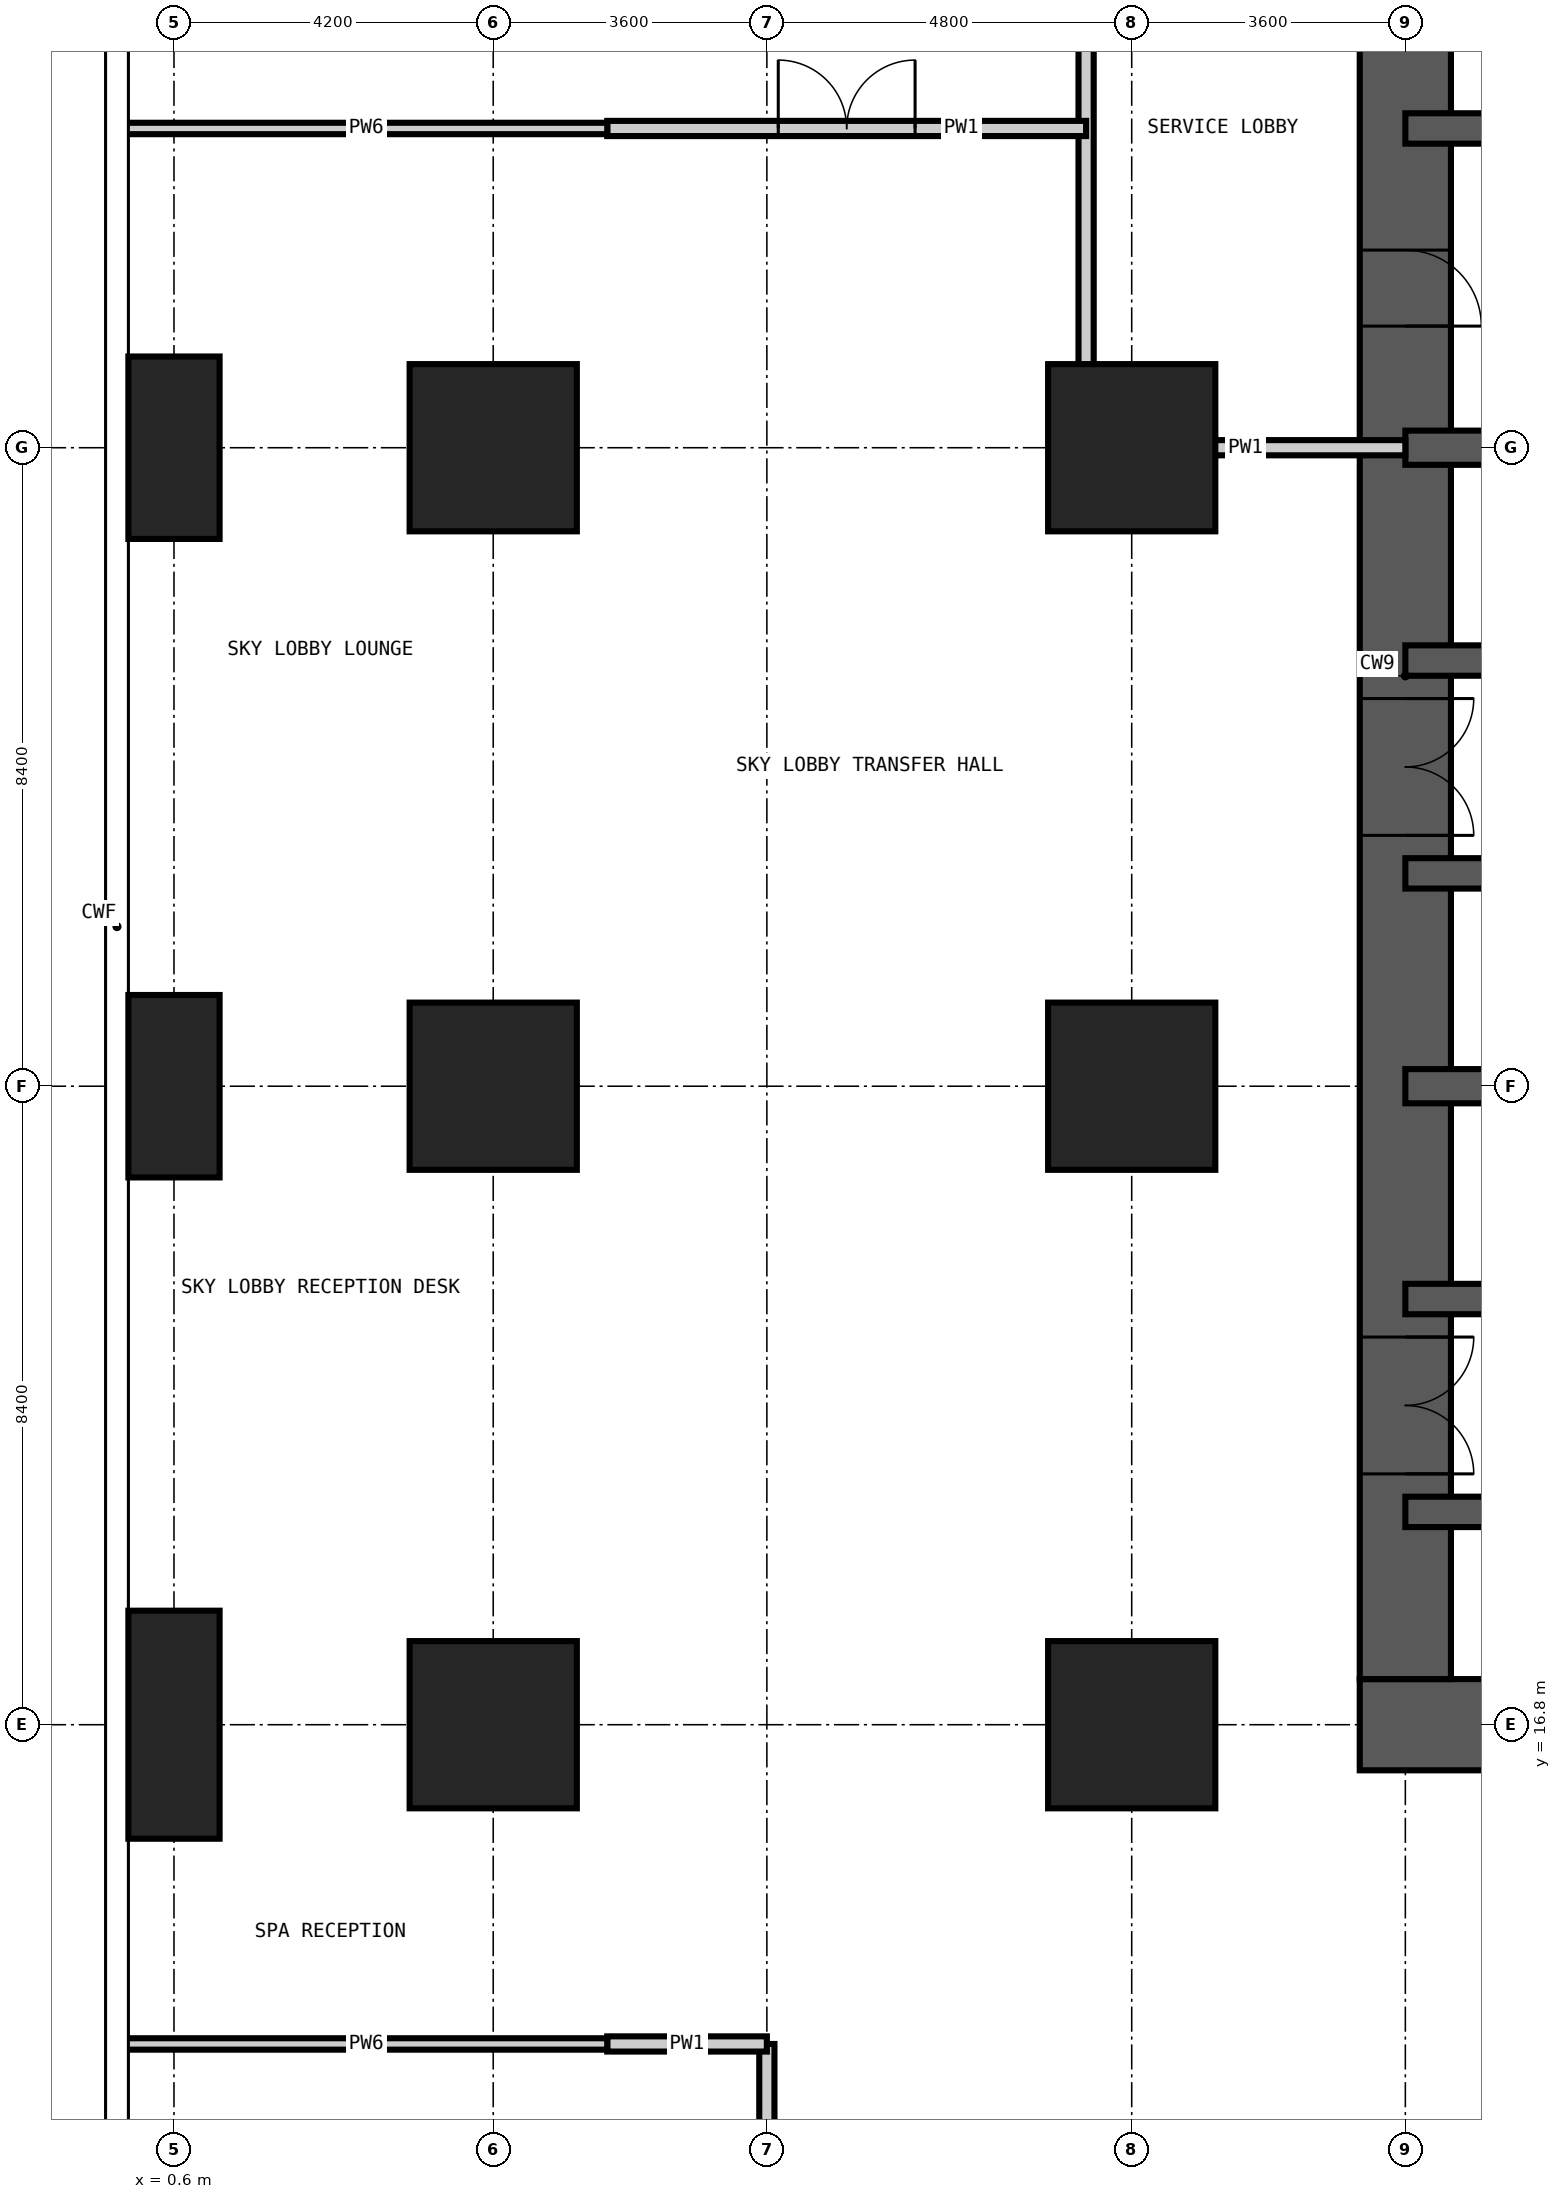
"""IFC4 building model, lengths in metres.
Left out: names, types, materials, properties, quantities, classifications, styles, units other than length and angle.
Written with IfcOpenShell. Run it as: python <this file> out.ifc"""

import sys

from ifc_helpers import new_model, si_unit, direction, frame, frame_2d, origin, origin_2d, place, context, subcontext, project, spatial, rectangle, extrude, element, fill, save


model = new_model("IFC4")
c1 = context("Model", 3, precision=1e-05, world=origin(), true_north=direction((0.0, 1.0)))
c2 = subcontext(c1, "Body", "Model", "MODEL_VIEW")
j1 = project(units=[si_unit("LENGTHUNIT", "METRE"), si_unit("PLANEANGLEUNIT", "RADIAN")], contexts=[c1])
p1 = place(None, origin())
s1 = spatial("IfcSite", under=j1, at=p1, CompositionType="ELEMENT")
p2 = place(p1, origin())
s2 = spatial("IfcBuilding", under=s1, at=p2, CompositionType="ELEMENT")
p3 = place(p2, frame((0.0, 0.0, 147.6)))
s3 = spatial("IfcBuildingStorey", under=s2, at=p3, CompositionType="ELEMENT", Elevation=147.6)
p4 = place(p3, frame((0.6, 16.8, -0.35), z_axis=(0.0, 0.0, 1.0), x_axis=(1.0, 0.0, 0.0)))
e1 = element("IfcColumn", 1, at=p4, inside=s3, PredefinedType="COLUMN", context=c2, shape_type="SweptSolid", body=[
    extrude(rectangle(XDim=1.2, YDim=3.0, at=origin_2d()), origin(), (0.0, 0.0, 1.0), 5.95),
])
for number, where, z_axis, x_axis in (
    (2, (0.6, 25.2, -0.35), (0.0, 0.0, 1.0), (1.0, 0.0, 0.0)),
    (3, (0.6, 33.6, -0.35), (0.0, 0.0, 1.0), (1.0, 0.0, 0.0)),
):
    element("IfcColumn", number, at=place(p3, frame(where, z_axis=z_axis, x_axis=x_axis)), inside=s3, PredefinedType="COLUMN", context=c2, shape_type="SweptSolid", body=[
        extrude(rectangle(XDim=1.2, YDim=2.4, at=origin_2d()), origin(), (0.0, 0.0, 1.0), 5.95),
    ])
for number, where, z_axis, x_axis in (
    (4, (4.8, 16.8, -0.35), (0.0, 0.0, 1.0), (1.0, 0.0, 0.0)),
    (5, (4.8, 25.2, -0.35), (0.0, 0.0, 1.0), (1.0, 0.0, 0.0)),
    (6, (4.8, 33.6, -0.35), (0.0, 0.0, 1.0), (1.0, 0.0, 0.0)),
    (7, (13.2, 16.8, -0.35), (0.0, 0.0, 1.0), (1.0, 0.0, 0.0)),
    (8, (13.2, 25.2, -0.35), (0.0, 0.0, 1.0), (1.0, 0.0, 0.0)),
    (9, (13.2, 33.6, -0.35), (0.0, 0.0, 1.0), (1.0, 0.0, 0.0)),
):
    element("IfcColumn", number, at=place(p3, frame(where, z_axis=z_axis, x_axis=x_axis)), inside=s3, PredefinedType="COLUMN", context=c2, shape_type="SweptSolid", body=[
        extrude(rectangle(XDim=2.2, YDim=2.2, at=origin_2d()), origin(), (0.0, 0.0, 1.0), 5.95),
    ])
p5 = place(p3, frame((16.2, 16.8, -0.35), z_axis=(0.0, 0.0, 1.0), x_axis=(1.0, 0.0, 0.0)))
e10 = element("IfcWall", 10, at=p5, inside=s3, PredefinedType="SHEAR", context=c2, shape_type="SweptSolid", body=[
    extrude(rectangle(XDim=26.4, YDim=1.2, at=frame_2d((13.2, 0.0))), origin(), (0.0, 0.0, 1.0), 5.95),
])
p6 = place(p5, frame((12.7, 0.0, 0.35)))
e11 = element("IfcOpeningElement", 11, at=p6, cuts=e10, PredefinedType="OPENING", context=c2, shape_type="SweptSolid", body=[
    extrude(rectangle(XDim=1.0, YDim=2.1, at=frame_2d((0.5, 1.05))), frame((0.0, 0.61, 0.0), z_axis=(0.0, -1.0, 0.0), x_axis=(1.0, 0.0, 0.0)), (0.0, 0.0, 1.0), 1.22),
])
p7 = place(p5, frame((19.0, 0.0, 0.35)))
e12 = element("IfcOpeningElement", 12, at=p7, cuts=e10, PredefinedType="OPENING", context=c2, shape_type="SweptSolid", body=[
    extrude(rectangle(XDim=1.0, YDim=2.1, at=frame_2d((0.5, 1.05))), frame((0.0, 0.61, 0.0), z_axis=(0.0, -1.0, 0.0), x_axis=(1.0, 0.0, 0.0)), (0.0, 0.0, 1.0), 1.22),
])
p8 = place(p3, frame((16.8, 41.4, -0.35), z_axis=(0.0, 0.0, 1.0), x_axis=(0.0, -1.0, 0.0)))
e13 = element("IfcWall", 13, at=p8, inside=s3, PredefinedType="SHEAR", context=c2, shape_type="SweptSolid", body=[
    extrude(rectangle(XDim=24.0, YDim=1.2, at=frame_2d((12.0, 0.0))), origin(), (0.0, 0.0, 1.0), 5.95),
])
p9 = place(p8, frame((11.1, 0.0, 0.35)))
e14 = element("IfcOpeningElement", 14, at=p9, cuts=e13, PredefinedType="OPENING", context=c2, shape_type="SweptSolid", body=[
    extrude(rectangle(XDim=1.8, YDim=2.2, at=frame_2d((0.9, 1.1))), frame((0.0, 0.61, 0.0), z_axis=(0.0, -1.0, 0.0), x_axis=(1.0, 0.0, 0.0)), (0.0, 0.0, 1.0), 1.22),
])
p10 = place(p8, frame((19.5, 0.0, 0.35)))
e15 = element("IfcOpeningElement", 15, at=p10, cuts=e13, PredefinedType="OPENING", context=c2, shape_type="SweptSolid", body=[
    extrude(rectangle(XDim=1.8, YDim=2.2, at=frame_2d((0.9, 1.1))), frame((0.0, 0.61, 0.0), z_axis=(0.0, -1.0, 0.0), x_axis=(1.0, 0.0, 0.0)), (0.0, 0.0, 1.0), 1.22),
])
p11 = place(p8, frame((5.2, 0.0, 0.35)))
e16 = element("IfcOpeningElement", 16, at=p11, cuts=e13, PredefinedType="OPENING", context=c2, shape_type="SweptSolid", body=[
    extrude(rectangle(XDim=1.0, YDim=2.1, at=frame_2d((0.5, 1.05))), frame((0.0, 0.61, 0.0), z_axis=(0.0, -1.0, 0.0), x_axis=(1.0, 0.0, 0.0)), (0.0, 0.0, 1.0), 1.22),
])
p12 = place(p3, frame((16.8, 19.6, -0.35), z_axis=(0.0, 0.0, 1.0), x_axis=(1.0, 0.0, 0.0)))
e17 = element("IfcWall", 17, at=p12, inside=s3, PredefinedType="SHEAR", context=c2, shape_type="SweptSolid", body=[
    extrude(rectangle(XDim=8.4, YDim=0.4, at=frame_2d((4.2, 0.0))), origin(), (0.0, 0.0, 1.0), 5.95),
])
p13 = place(p12, frame((1.55, 0.0, 0.35)))
e18 = element("IfcOpeningElement", 18, at=p13, cuts=e17, PredefinedType="OPENING", context=c2, shape_type="SweptSolid", body=[
    extrude(rectangle(XDim=1.1, YDim=2.2, at=frame_2d((0.55, 1.1))), frame((0.0, 0.21, 0.0), z_axis=(0.0, -1.0, 0.0), x_axis=(1.0, 0.0, 0.0)), (0.0, 0.0, 1.0), 0.42),
])
p14 = place(p12, frame((5.75, 0.0, 0.35)))
e19 = element("IfcOpeningElement", 19, at=p14, cuts=e17, PredefinedType="OPENING", context=c2, shape_type="SweptSolid", body=[
    extrude(rectangle(XDim=1.1, YDim=2.2, at=frame_2d((0.55, 1.1))), frame((0.0, 0.21, 0.0), z_axis=(0.0, -1.0, 0.0), x_axis=(1.0, 0.0, 0.0)), (0.0, 0.0, 1.0), 0.42),
])
p15 = place(p3, frame((16.8, 22.4, -0.35), z_axis=(0.0, 0.0, 1.0), x_axis=(1.0, 0.0, 0.0)))
e20 = element("IfcWall", 20, at=p15, inside=s3, PredefinedType="SHEAR", context=c2, shape_type="SweptSolid", body=[
    extrude(rectangle(XDim=8.4, YDim=0.4, at=frame_2d((4.2, 0.0))), origin(), (0.0, 0.0, 1.0), 5.95),
])
p16 = place(p15, frame((1.55, 0.0, 0.35)))
e21 = element("IfcOpeningElement", 21, at=p16, cuts=e20, PredefinedType="OPENING", context=c2, shape_type="SweptSolid", body=[
    extrude(rectangle(XDim=1.1, YDim=2.2, at=frame_2d((0.55, 1.1))), frame((0.0, 0.21, 0.0), z_axis=(0.0, -1.0, 0.0), x_axis=(1.0, 0.0, 0.0)), (0.0, 0.0, 1.0), 0.42),
])
p17 = place(p15, frame((5.75, 0.0, 0.35)))
e22 = element("IfcOpeningElement", 22, at=p17, cuts=e20, PredefinedType="OPENING", context=c2, shape_type="SweptSolid", body=[
    extrude(rectangle(XDim=1.1, YDim=2.2, at=frame_2d((0.55, 1.1))), frame((0.0, 0.21, 0.0), z_axis=(0.0, -1.0, 0.0), x_axis=(1.0, 0.0, 0.0)), (0.0, 0.0, 1.0), 0.42),
])
p18 = place(p3, frame((16.8, 28.0, -0.35), z_axis=(0.0, 0.0, 1.0), x_axis=(1.0, 0.0, 0.0)))
e23 = element("IfcWall", 23, at=p18, inside=s3, PredefinedType="SHEAR", context=c2, shape_type="SweptSolid", body=[
    extrude(rectangle(XDim=8.4, YDim=0.4, at=frame_2d((4.2, 0.0))), origin(), (0.0, 0.0, 1.0), 5.95),
])
p19 = place(p18, frame((1.55, 0.0, 0.35)))
e24 = element("IfcOpeningElement", 24, at=p19, cuts=e23, PredefinedType="OPENING", context=c2, shape_type="SweptSolid", body=[
    extrude(rectangle(XDim=1.1, YDim=2.2, at=frame_2d((0.55, 1.1))), frame((0.0, 0.21, 0.0), z_axis=(0.0, -1.0, 0.0), x_axis=(1.0, 0.0, 0.0)), (0.0, 0.0, 1.0), 0.42),
])
p20 = place(p18, frame((5.75, 0.0, 0.35)))
e25 = element("IfcOpeningElement", 25, at=p20, cuts=e23, PredefinedType="OPENING", context=c2, shape_type="SweptSolid", body=[
    extrude(rectangle(XDim=1.1, YDim=2.2, at=frame_2d((0.55, 1.1))), frame((0.0, 0.21, 0.0), z_axis=(0.0, -1.0, 0.0), x_axis=(1.0, 0.0, 0.0)), (0.0, 0.0, 1.0), 0.42),
])
p21 = place(p3, frame((16.8, 30.8, -0.35), z_axis=(0.0, 0.0, 1.0), x_axis=(1.0, 0.0, 0.0)))
e26 = element("IfcWall", 26, at=p21, inside=s3, PredefinedType="SHEAR", context=c2, shape_type="SweptSolid", body=[
    extrude(rectangle(XDim=8.4, YDim=0.4, at=frame_2d((4.2, 0.0))), origin(), (0.0, 0.0, 1.0), 5.95),
])
p22 = place(p21, frame((1.55, 0.0, 0.35)))
e27 = element("IfcOpeningElement", 27, at=p22, cuts=e26, PredefinedType="OPENING", context=c2, shape_type="SweptSolid", body=[
    extrude(rectangle(XDim=1.1, YDim=2.2, at=frame_2d((0.55, 1.1))), frame((0.0, 0.21, 0.0), z_axis=(0.0, -1.0, 0.0), x_axis=(1.0, 0.0, 0.0)), (0.0, 0.0, 1.0), 0.42),
])
p23 = place(p21, frame((5.75, 0.0, 0.35)))
e28 = element("IfcOpeningElement", 28, at=p23, cuts=e26, PredefinedType="OPENING", context=c2, shape_type="SweptSolid", body=[
    extrude(rectangle(XDim=1.1, YDim=2.2, at=frame_2d((0.55, 1.1))), frame((0.0, 0.21, 0.0), z_axis=(0.0, -1.0, 0.0), x_axis=(1.0, 0.0, 0.0)), (0.0, 0.0, 1.0), 0.42),
])
p24 = place(p3, frame((16.8, 37.8, -0.35), z_axis=(0.0, 0.0, 1.0), x_axis=(1.0, 0.0, 0.0)))
e29 = element("IfcWall", 29, at=p24, inside=s3, PredefinedType="SHEAR", context=c2, shape_type="SweptSolid", body=[
    extrude(rectangle(XDim=8.4, YDim=0.4, at=frame_2d((4.2, 0.0))), origin(), (0.0, 0.0, 1.0), 5.95),
])
p25 = place(p3, frame((16.8, 25.2, -0.35), z_axis=(0.0, 0.0, 1.0), x_axis=(1.0, 0.0, 0.0)))
e30 = element("IfcWall", 30, at=p25, inside=s3, PredefinedType="SHEAR", context=c2, shape_type="SweptSolid", body=[
    extrude(rectangle(XDim=25.2, YDim=0.45, at=frame_2d((12.6, 0.0))), origin(), (0.0, 0.0, 1.0), 5.95),
])
p26 = place(p3, frame((16.8, 33.6, -0.35), z_axis=(0.0, 0.0, 1.0), x_axis=(1.0, 0.0, 0.0)))
e31 = element("IfcWall", 31, at=p26, inside=s3, PredefinedType="SHEAR", context=c2, shape_type="SweptSolid", body=[
    extrude(rectangle(XDim=25.2, YDim=0.45, at=frame_2d((12.6, 0.0))), origin(), (0.0, 0.0, 1.0), 5.95),
])
p27 = place(p26, frame((14.2, 0.0, 0.35)))
e32 = element("IfcOpeningElement", 32, at=p27, cuts=e31, PredefinedType="OPENING", context=c2, shape_type="SweptSolid", body=[
    extrude(rectangle(XDim=1.0, YDim=2.1, at=frame_2d((0.5, 1.05))), frame((0.0, 0.235, 0.0), z_axis=(0.0, -1.0, 0.0), x_axis=(1.0, 0.0, 0.0)), (0.0, 0.0, 1.0), 0.47),
])
p28 = place(p3, frame((8.4, 8.4, 0.0), z_axis=(0.0, 0.0, 1.0), x_axis=(0.0, 1.0, 0.0)))
e33 = element("IfcWall", 33, at=p28, inside=s3, PredefinedType="PARTITIONING", context=c2, shape_type="SweptSolid", body=[
    extrude(rectangle(XDim=4.2, YDim=0.2, at=frame_2d((2.1, 0.0))), origin(), (0.0, 0.0, 1.0), 5.6),
])
p29 = place(p28, frame((1.6, 0.0, 0.0)))
e34 = element("IfcOpeningElement", 34, at=p29, cuts=e33, PredefinedType="OPENING", context=c2, shape_type="SweptSolid", body=[
    extrude(rectangle(XDim=1.0, YDim=2.1, at=frame_2d((0.5, 1.05))), frame((0.0, 0.11, 0.0), z_axis=(0.0, -1.0, 0.0), x_axis=(1.0, 0.0, 0.0)), (0.0, 0.0, 1.0), 0.22),
])
p30 = place(p3, frame((12.6, 33.6, 0.0), z_axis=(0.0, 0.0, 1.0), x_axis=(0.0, 1.0, 0.0)))
e35 = element("IfcWall", 35, at=p30, inside=s3, PredefinedType="PARTITIONING", context=c2, shape_type="SweptSolid", body=[
    extrude(rectangle(XDim=12.6, YDim=0.2, at=frame_2d((6.3, 0.0))), origin(), (0.0, 0.0, 1.0), 5.6),
])
p31 = place(p3, frame((6.3, 12.6, 0.0), z_axis=(0.0, 0.0, 1.0), x_axis=(1.0, 0.0, 0.0)))
e36 = element("IfcWall", 36, at=p31, inside=s3, PredefinedType="PARTITIONING", context=c2, shape_type="SweptSolid", body=[
    extrude(rectangle(XDim=2.1, YDim=0.2, at=frame_2d((1.05, 0.0))), origin(), (0.0, 0.0, 1.0), 5.6),
])
p32 = place(p3, frame((12.6, 33.6, 0.0), z_axis=(0.0, 0.0, 1.0), x_axis=(1.0, 0.0, 0.0)))
e37 = element("IfcWall", 37, at=p32, inside=s3, PredefinedType="PARTITIONING", context=c2, shape_type="SweptSolid", body=[
    extrude(rectangle(XDim=4.2, YDim=0.2, at=frame_2d((2.1, 0.0))), origin(), (0.0, 0.0, 1.0), 5.6),
])
p33 = place(p3, frame((6.3, 37.8, 0.0), z_axis=(0.0, 0.0, 1.0), x_axis=(1.0, 0.0, 0.0)))
e38 = element("IfcWall", 38, at=p33, inside=s3, PredefinedType="PARTITIONING", context=c2, shape_type="SweptSolid", body=[
    extrude(rectangle(XDim=6.3, YDim=0.2, at=frame_2d((3.15, 0.0))), origin(), (0.0, 0.0, 1.0), 5.6),
])
p34 = place(p33, frame((2.25, 0.0, 0.0)))
e39 = element("IfcOpeningElement", 39, at=p34, cuts=e38, PredefinedType="OPENING", context=c2, shape_type="SweptSolid", body=[
    extrude(rectangle(XDim=1.8, YDim=2.4, at=frame_2d((0.9, 1.2))), frame((0.0, 0.11, 0.0), z_axis=(0.0, -1.0, 0.0), x_axis=(1.0, 0.0, 0.0)), (0.0, 0.0, 1.0), 0.22),
])
for number, where, z_axis, x_axis in (
    (40, (-0.038, 12.6, 0.0), (0.0, 0.0, 1.0), (1.0, 0.0, 0.0)),
    (41, (-0.038, 37.8, 0.0), (0.0, 0.0, 1.0), (1.0, 0.0, 0.0)),
):
    element("IfcWall", number, at=place(p3, frame(where, z_axis=z_axis, x_axis=x_axis)), inside=s3, PredefinedType="PARTITIONING", context=c2, shape_type="SweptSolid", body=[
        extrude(rectangle(XDim=6.338, YDim=0.15, at=frame_2d((3.169, 0.0))), origin(), (0.0, 0.0, 1.0), 5.6),
    ])
p35 = place(p9, origin())
e42 = element("IfcDoor", 42, at=p35, inside=s3, OperationType="DOUBLE_DOOR_DOUBLE_SWING", PredefinedType="DOOR", context=c2, shape_type="SweptSolid", body=[
    extrude(rectangle(XDim=1.8, YDim=2.2, at=frame_2d((0.9, 1.1))), frame((0.0, 0.025, 0.0), z_axis=(0.0, -1.0, 0.0), x_axis=(1.0, 0.0, 0.0)), (0.0, 0.0, 1.0), 0.05),
])
fill(e14, e42)
p36 = place(p10, origin())
e43 = element("IfcDoor", 43, at=p36, inside=s3, OperationType="DOUBLE_DOOR_DOUBLE_SWING", PredefinedType="DOOR", context=c2, shape_type="SweptSolid", body=[
    extrude(rectangle(XDim=1.8, YDim=2.2, at=frame_2d((0.9, 1.1))), frame((0.0, 0.025, 0.0), z_axis=(0.0, -1.0, 0.0), x_axis=(1.0, 0.0, 0.0)), (0.0, 0.0, 1.0), 0.05),
])
fill(e15, e43)
p37 = place(p11, origin())
e44 = element("IfcDoor", 44, at=p37, inside=s3, OperationType="SINGLE_SWING_RIGHT", PredefinedType="DOOR", context=c2, shape_type="SweptSolid", body=[
    extrude(rectangle(XDim=1.0, YDim=2.1, at=frame_2d((0.5, 1.05))), frame((0.0, 0.025, 0.0), z_axis=(0.0, -1.0, 0.0), x_axis=(1.0, 0.0, 0.0)), (0.0, 0.0, 1.0), 0.05),
])
fill(e16, e44)
p38 = place(p34, origin())
e45 = element("IfcDoor", 45, at=p38, inside=s3, OperationType="DOUBLE_DOOR_DOUBLE_SWING", PredefinedType="DOOR", context=c2, shape_type="SweptSolid", body=[
    extrude(rectangle(XDim=1.8, YDim=2.4, at=frame_2d((0.9, 1.2))), frame((0.0, 0.025, 0.0), z_axis=(0.0, -1.0, 0.0), x_axis=(1.0, 0.0, 0.0)), (0.0, 0.0, 1.0), 0.05),
])
fill(e39, e45)
save(model, sys.argv[1])
